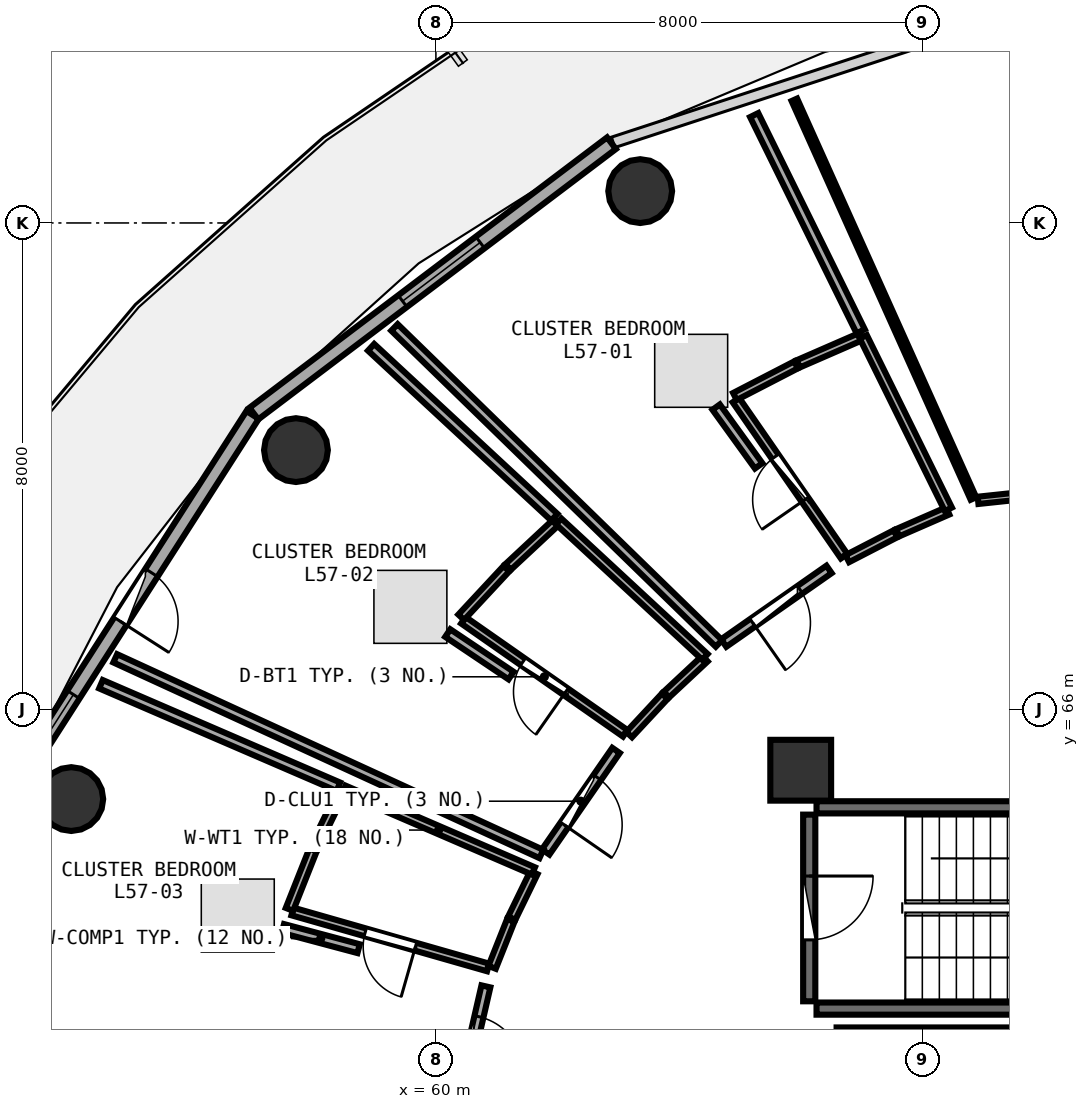
"""IFC4 building model, lengths in metres.
Left out: names, types, materials, properties, quantities, classifications, styles, units other than length and angle.
Written with IfcOpenShell. Run it as: python <this file> out.ifc"""

import sys

from ifc_helpers import new_model, si_unit, direction, frame, frame_2d, origin, origin_2d, place, context, subcontext, project, spatial, rectangle, circle, extrude, element, fill, save


model = new_model("IFC4")
c1 = context("Model", 3, precision=1e-05, world=origin(), true_north=direction((0.0, 1.0)))
c2 = subcontext(c1, "Body", "Model", "MODEL_VIEW")
j1 = project(units=[si_unit("LENGTHUNIT", "METRE"), si_unit("PLANEANGLEUNIT", "RADIAN")], contexts=[c1])
p1 = place(None, origin())
s1 = spatial("IfcSite", under=j1, at=p1, CompositionType="ELEMENT")
p2 = place(p1, origin())
s2 = spatial("IfcBuilding", under=s1, at=p2, CompositionType="ELEMENT")
p3 = place(p2, frame((0.0, 0.0, 223.2)))
s3 = spatial("IfcBuildingStorey", under=s2, at=p3, CompositionType="ELEMENT", Elevation=223.2)
p4 = place(p3, frame((66.0, 65.0, 0.0), z_axis=(0.0, 0.0, 1.0), x_axis=(1.0, 0.0, 0.0)))
e1 = element("IfcColumn", 1, at=p4, inside=s3, PredefinedType="PILASTER", context=c2, shape_type="SweptSolid", body=[
    extrude(rectangle(XDim=1.0, YDim=1.0, at=origin_2d()), origin(), (0.0, 0.0, 1.0), 3.75),
])
for number, where, z_axis, x_axis in (
    (2, (63.36, 74.524, 0.0), (0.0, 0.0, 1.0), (1.0, 0.0, 0.0)),
    (3, (57.698, 70.264, 0.0), (0.0, 0.0, 1.0), (1.0, 0.0, 0.0)),
    (4, (54.003, 64.526, 0.0), (0.0, 0.0, 1.0), (1.0, 0.0, 0.0)),
):
    element("IfcColumn", number, at=place(p3, frame(where, z_axis=z_axis, x_axis=x_axis)), inside=s3, PredefinedType="COLUMN", context=c2, shape_type="SweptSolid", body=[
        extrude(circle(Radius=0.525, at=origin_2d()), origin(), (0.0, 0.0, 1.0), 3.75),
    ])
p5 = place(p3, frame((62.888, 75.312, 0.0), z_axis=(0.0, 0.0, 1.0), x_axis=(-0.797701674595, -0.603052268338, 0.0)))
e5 = element("IfcWall", 5, at=p5, inside=s3, PredefinedType="SOLIDWALL", context=c2, shape_type="SweptSolid", body=[
    extrude(rectangle(XDim=7.374, YDim=0.24, at=frame_2d((3.687, 0.0))), origin(), (0.0, 0.0, 1.0), 3.475),
])
p6 = place(p5, frame((2.707, 0.0, 0.85)))
e6 = element("IfcOpeningElement", 6, at=p6, cuts=e5, PredefinedType="OPENING", context=c2, shape_type="SweptSolid", body=[
    extrude(rectangle(XDim=1.6, YDim=1.45, at=frame_2d((0.8, 0.725))), frame((0.0, 0.13, 0.0), z_axis=(0.0, -1.0, 0.0), x_axis=(1.0, 0.0, 0.0)), (0.0, 0.0, 1.0), 0.26),
])
p7 = place(p3, frame((56.986, 70.843, 0.0), z_axis=(0.0, 0.0, 1.0), x_axis=(-0.539539512973, -0.841960280501, 0.0)))
e7 = element("IfcWall", 7, at=p7, inside=s3, PredefinedType="SOLIDWALL", context=c2, shape_type="SweptSolid", body=[
    extrude(rectangle(XDim=7.115, YDim=0.24, at=frame_2d((3.557, 0.0))), origin(), (0.0, 0.0, 1.0), 3.475),
])
p8 = place(p7, frame((3.082, 0.0, 0.0)))
e8 = element("IfcOpeningElement", 8, at=p8, cuts=e7, PredefinedType="OPENING", context=c2, shape_type="SweptSolid", body=[
    extrude(rectangle(XDim=0.95, YDim=2.1, at=frame_2d((0.475, 1.05))), frame((0.0, 0.13, 0.0), z_axis=(0.0, -1.0, 0.0), x_axis=(1.0, 0.0, 0.0)), (0.0, 0.0, 1.0), 0.26),
])
p9 = place(p7, frame((5.462, 0.0, 0.85)))
e9 = element("IfcOpeningElement", 9, at=p9, cuts=e7, PredefinedType="OPENING", context=c2, shape_type="SweptSolid", body=[
    extrude(rectangle(XDim=1.2, YDim=1.45, at=frame_2d((0.6, 0.725))), frame((0.0, 0.13, 0.0), z_axis=(0.0, -1.0, 0.0), x_axis=(1.0, 0.0, 0.0)), (0.0, 0.0, 1.0), 0.26),
])
for number, where, z_axis, x_axis in (
    (10, (66.26, 61.08, 0.0), (0.0, 0.0, 1.0), (1.0, 0.0, 0.0)),
    (11, (73.42, 64.39, 0.0), (0.0, 0.0, 1.0), (-1.0, 0.0, 0.0)),
):
    element("IfcWall", number, at=place(p3, frame(where, z_axis=z_axis, x_axis=x_axis)), inside=s3, PredefinedType="SHEAR", context=c2, shape_type="SweptSolid", body=[
        extrude(rectangle(XDim=7.16, YDim=0.2, at=frame_2d((3.58, 0.0))), origin(), (0.0, 0.0, 1.0), 3.49),
    ])
p10 = place(p3, frame((66.14, 64.27, 0.0), z_axis=(0.0, 0.0, 1.0), x_axis=(0.0, -1.0, 0.0)))
e12 = element("IfcWall", 12, at=p10, inside=s3, PredefinedType="SHEAR", context=c2, shape_type="SweptSolid", body=[
    extrude(rectangle(XDim=3.07, YDim=0.2, at=frame_2d((1.535, 0.0))), origin(), (0.0, 0.0, 1.0), 3.49),
])
p11 = place(p10, frame((1.01, 0.0, 0.0)))
e13 = element("IfcOpeningElement", 13, at=p11, cuts=e12, PredefinedType="OPENING", context=c2, shape_type="SweptSolid", body=[
    extrude(rectangle(XDim=1.05, YDim=2.1, at=frame_2d((0.525, 1.05))), frame((0.0, 0.11, 0.0), z_axis=(0.0, -1.0, 0.0), x_axis=(1.0, 0.0, 0.0)), (0.0, 0.0, 1.0), 0.22),
])
p12 = place(p3, frame((75.969, 70.189, 0.0), z_axis=(0.0, 0.0, 1.0), x_axis=(-0.994385599796, -0.105817195755, 0.0)))
e14 = element("IfcWall", 14, at=p12, inside=s3, PredefinedType="PARTITIONING", context=c2, shape_type="SweptSolid", body=[
    extrude(rectangle(XDim=7.092, YDim=0.12, at=frame_2d((3.546, 0.0))), origin(), (0.0, 0.0, 1.0), 3.025),
])
p13 = place(p12, frame((3.096, 0.0, 0.0)))
e15 = element("IfcOpeningElement", 15, at=p13, cuts=e14, PredefinedType="OPENING", context=c2, shape_type="SweptSolid", body=[
    extrude(rectangle(XDim=0.9, YDim=2.08, at=frame_2d((0.45, 1.04))), frame((0.0, 0.07, 0.0), z_axis=(0.0, -1.0, 0.0), x_axis=(1.0, 0.0, 0.0)), (0.0, 0.0, 1.0), 0.14),
])
p14 = place(p3, frame((66.714, 68.519, 0.0), z_axis=(0.0, 0.0, 1.0), x_axis=(-0.569575575996, 0.821938965635, 0.0)))
e16 = element("IfcWall", 16, at=p14, inside=s3, PredefinedType="PLUMBINGWALL", context=c2, shape_type="SweptSolid", body=[
    extrude(rectangle(XDim=3.125, YDim=0.13, at=frame_2d((1.562, 0.0))), origin(), (0.0, 0.0, 1.0), 3.175),
])
p15 = place(p14, frame((1.132, 0.0, 0.0)))
e17 = element("IfcOpeningElement", 17, at=p15, cuts=e16, PredefinedType="OPENING", context=c2, shape_type="SweptSolid", body=[
    extrude(rectangle(XDim=0.86, YDim=2.05, at=frame_2d((0.43, 1.025))), frame((0.0, 0.075, 0.0), z_axis=(0.0, -1.0, 0.0), x_axis=(1.0, 0.0, 0.0)), (0.0, 0.0, 1.0), 0.15),
])
p16 = place(p3, frame((66.466, 68.302, 0.0), z_axis=(0.0, 0.0, 1.0), x_axis=(-0.819606107513, -0.572927419948, 0.0)))
e18 = element("IfcWall", 18, at=p16, inside=s3, PredefinedType="PARTITIONING", context=c2, shape_type="SweptSolid", body=[
    extrude(rectangle(XDim=2.114, YDim=0.15, at=frame_2d((1.057, 0.0))), origin(), (0.0, 0.0, 1.0), 3.025),
])
p17 = place(p16, frame((0.582, 0.0, 0.0)))
e19 = element("IfcOpeningElement", 19, at=p17, cuts=e18, PredefinedType="OPENING", context=c2, shape_type="SweptSolid", body=[
    extrude(rectangle(XDim=0.95, YDim=2.08, at=frame_2d((0.475, 1.04))), frame((0.0, 0.085, 0.0), z_axis=(0.0, -1.0, 0.0), x_axis=(1.0, 0.0, 0.0)), (0.0, 0.0, 1.0), 0.17),
])
p18 = place(p3, frame((63.115, 65.606, 0.0), z_axis=(0.0, 0.0, 1.0), x_axis=(-0.819768322712, 0.57269529165, 0.0)))
e20 = element("IfcWall", 20, at=p18, inside=s3, PredefinedType="PLUMBINGWALL", context=c2, shape_type="SweptSolid", body=[
    extrude(rectangle(XDim=3.248, YDim=0.13, at=frame_2d((1.624, 0.0))), origin(), (0.0, 0.0, 1.0), 3.175),
])
p19 = place(p18, frame((1.194, 0.0, 0.0)))
e21 = element("IfcOpeningElement", 21, at=p19, cuts=e20, PredefinedType="OPENING", context=c2, shape_type="SweptSolid", body=[
    extrude(rectangle(XDim=0.86, YDim=2.05, at=frame_2d((0.43, 1.025))), frame((0.0, 0.075, 0.0), z_axis=(0.0, -1.0, 0.0), x_axis=(1.0, 0.0, 0.0)), (0.0, 0.0, 1.0), 0.15),
])
p20 = place(p3, frame((62.963, 65.326, 0.0), z_axis=(0.0, 0.0, 1.0), x_axis=(-0.569634666298, -0.821898014933, 0.0)))
e22 = element("IfcWall", 22, at=p20, inside=s3, PredefinedType="PARTITIONING", context=c2, shape_type="SweptSolid", body=[
    extrude(rectangle(XDim=2.032, YDim=0.15, at=frame_2d((1.016, 0.0))), origin(), (0.0, 0.0, 1.0), 3.025),
])
p21 = place(p20, frame((0.541, 0.0, 0.0)))
e23 = element("IfcOpeningElement", 23, at=p21, cuts=e22, PredefinedType="OPENING", context=c2, shape_type="SweptSolid", body=[
    extrude(rectangle(XDim=0.95, YDim=2.08, at=frame_2d((0.475, 1.04))), frame((0.0, 0.085, 0.0), z_axis=(0.0, -1.0, 0.0), x_axis=(1.0, 0.0, 0.0)), (0.0, 0.0, 1.0), 0.17),
])
p22 = place(p3, frame((60.859, 61.757, 0.0), z_axis=(0.0, 0.0, 1.0), x_axis=(-0.961479890051, 0.274875282679, 0.0)))
e24 = element("IfcWall", 24, at=p22, inside=s3, PredefinedType="PLUMBINGWALL", context=c2, shape_type="SweptSolid", body=[
    extrude(rectangle(XDim=3.347, YDim=0.13, at=frame_2d((1.673, 0.0))), origin(), (0.0, 0.0, 1.0), 3.175),
])
p23 = place(p22, frame((1.243, 0.0, 0.0)))
e25 = element("IfcOpeningElement", 25, at=p23, cuts=e24, PredefinedType="OPENING", context=c2, shape_type="SweptSolid", body=[
    extrude(rectangle(XDim=0.86, YDim=2.05, at=frame_2d((0.43, 1.025))), frame((0.0, 0.075, 0.0), z_axis=(0.0, -1.0, 0.0), x_axis=(1.0, 0.0, 0.0)), (0.0, 0.0, 1.0), 0.15),
])
p24 = place(p3, frame((60.823, 61.446, 0.0), z_axis=(0.0, 0.0, 1.0), x_axis=(-0.223956243079, -0.97459920028, 0.0)))
e26 = element("IfcWall", 26, at=p24, inside=s3, PredefinedType="PARTITIONING", context=c2, shape_type="SweptSolid", body=[
    extrude(rectangle(XDim=1.974, YDim=0.15, at=frame_2d((0.987, 0.0))), origin(), (0.0, 0.0, 1.0), 3.48),
])
p25 = place(p24, frame((0.512, 0.0, 0.0)))
e27 = element("IfcOpeningElement", 27, at=p25, cuts=e26, PredefinedType="OPENING", context=c2, shape_type="SweptSolid", body=[
    extrude(rectangle(XDim=0.95, YDim=2.08, at=frame_2d((0.475, 1.04))), frame((0.0, 0.085, 0.0), z_axis=(0.0, -1.0, 0.0), x_axis=(1.0, 0.0, 0.0)), (0.0, 0.0, 1.0), 0.17),
])
p26 = place(p3, frame((72.41, 60.72, 0.0), z_axis=(0.0, 0.0, 1.0), x_axis=(-1.0, 0.0, 0.0)))
e28 = element("IfcWall", 28, at=p26, inside=s3, PredefinedType="PARTITIONING", context=c2, shape_type="SweptSolid", body=[
    extrude(rectangle(XDim=5.82, YDim=0.1, at=frame_2d((2.91, 0.0))), origin(), (0.0, 0.0, 1.0), 3.48),
])
p27 = place(p3, frame((68.841, 69.469, 0.0), z_axis=(0.0, 0.0, 1.0), x_axis=(-0.409724811959, 0.912209174732, 0.0)))
e29 = element("IfcWall", 29, at=p27, inside=s3, PredefinedType="PARTITIONING", context=c2, shape_type="SweptSolid", body=[
    extrude(rectangle(XDim=7.188, YDim=0.1, at=frame_2d((3.594, 0.0))), origin(), (0.0, 0.0, 1.0), 3.075),
])
p28 = place(p3, frame((68.419, 69.265, 0.0), z_axis=(0.0, 0.0, 1.0), x_axis=(-0.916724041683, -0.399521002453, 0.0)))
e30 = element("IfcWall", 30, at=p28, inside=s3, PredefinedType="PLUMBINGWALL", context=c2, shape_type="SweptSolid", body=[
    extrude(rectangle(XDim=0.898, YDim=0.13, at=frame_2d((0.449, 0.0))), origin(), (0.0, 0.0, 1.0), 3.235),
])
p29 = place(p3, frame((67.559, 68.889, 0.0), z_axis=(0.0, 0.0, 1.0), x_axis=(-0.888498384955, -0.458879744523, 0.0)))
e31 = element("IfcWall", 31, at=p29, inside=s3, PredefinedType="PLUMBINGWALL", context=c2, shape_type="SweptSolid", body=[
    extrude(rectangle(XDim=0.893, YDim=0.13, at=frame_2d((0.446, 0.0))), origin(), (0.0, 0.0, 1.0), 3.235),
])
p30 = place(p3, frame((64.918, 71.146, 0.0), z_axis=(0.0, 0.0, 1.0), x_axis=(0.88839364622, 0.459082486439, 0.0)))
e32 = element("IfcWall", 32, at=p30, inside=s3, PredefinedType="PLUMBINGWALL", context=c2, shape_type="SweptSolid", body=[
    extrude(rectangle(XDim=1.132, YDim=0.13, at=frame_2d((0.566, 0.0))), origin(), (0.0, 0.0, 1.0), 3.48),
])
p31 = place(p3, frame((65.959, 71.683, 0.0), z_axis=(0.0, 0.0, 1.0), x_axis=(0.916875363269, 0.399173606631, 0.0)))
e33 = element("IfcWall", 33, at=p31, inside=s3, PredefinedType="PLUMBINGWALL", context=c2, shape_type="SweptSolid", body=[
    extrude(rectangle(XDim=1.137, YDim=0.13, at=frame_2d((0.568, 0.0))), origin(), (0.0, 0.0, 1.0), 3.48),
])
p32 = place(p3, frame((67.029, 72.127, 0.0), z_axis=(0.0, 0.0, 1.0), x_axis=(0.442483009424, -0.896776887732, 0.0)))
e34 = element("IfcWall", 34, at=p32, inside=s3, PredefinedType="PLUMBINGWALL", context=c2, shape_type="SweptSolid", body=[
    extrude(rectangle(XDim=3.163, YDim=0.13, at=frame_2d((1.581, 0.0))), origin(), (0.0, 0.0, 1.0), 3.175),
])
p33 = place(p3, frame((64.655, 67.085, 0.0), z_axis=(0.0, 0.0, 1.0), x_axis=(-0.716418161924, 0.697671138335, 0.0)))
e35 = element("IfcWall", 35, at=p33, inside=s3, PredefinedType="PARTITIONING", context=c2, shape_type="SweptSolid", body=[
    extrude(rectangle(XDim=7.449, YDim=0.15, at=frame_2d((3.725, 0.0))), origin(), (0.0, 0.0, 1.0), 3.075),
])
p34 = place(p3, frame((65.235, 75.774, 0.0), z_axis=(0.0, 0.0, 1.0), x_axis=(0.441884590329, -0.897071908394, 0.0)))
e36 = element("IfcWall", 36, at=p34, inside=s3, PredefinedType="PARTITIONING", context=c2, shape_type="SweptSolid", body=[
    extrude(rectangle(XDim=3.964, YDim=0.15, at=frame_2d((1.982, 0.0))), origin(), (0.0, 0.0, 1.0), 3.075),
])
p35 = place(p3, frame((64.609, 70.972, 0.0), z_axis=(0.0, 0.0, 1.0), x_axis=(0.586088334164, -0.810247162634, 0.0)))
e37 = element("IfcWall", 37, at=p35, inside=s3, PredefinedType="PARTITIONING", context=c2, shape_type="SweptSolid", body=[
    extrude(rectangle(XDim=1.193, YDim=0.15, at=frame_2d((0.596, 0.0))), origin(), (0.0, 0.0, 1.0), 3.175),
])
p36 = place(p3, frame((64.425, 66.836, 0.0), z_axis=(0.0, 0.0, 1.0), x_axis=(-0.73090544696, -0.68247873784, 0.0)))
e38 = element("IfcWall", 38, at=p36, inside=s3, PredefinedType="PLUMBINGWALL", context=c2, shape_type="SweptSolid", body=[
    extrude(rectangle(XDim=0.867, YDim=0.13, at=frame_2d((0.434, 0.0))), origin(), (0.0, 0.0, 1.0), 3.025),
])
p37 = place(p3, frame((63.763, 66.216, 0.0), z_axis=(0.0, 0.0, 1.0), x_axis=(-0.681245485542, -0.732055044672, 0.0)))
e39 = element("IfcWall", 39, at=p37, inside=s3, PredefinedType="PLUMBINGWALL", context=c2, shape_type="SweptSolid", body=[
    extrude(rectangle(XDim=0.86, YDim=0.13, at=frame_2d((0.43, 0.0))), origin(), (0.0, 0.0, 1.0), 3.025),
])
p38 = place(p3, frame((60.417, 67.516, 0.0), z_axis=(0.0, 0.0, 1.0), x_axis=(0.68101744228, 0.732267193933, 0.0)))
e40 = element("IfcWall", 40, at=p38, inside=s3, PredefinedType="PLUMBINGWALL", context=c2, shape_type="SweptSolid", body=[
    extrude(rectangle(XDim=1.091, YDim=0.13, at=frame_2d((0.545, 0.0))), origin(), (0.0, 0.0, 1.0), 3.025),
])
p39 = place(p3, frame((61.188, 68.343, 0.0), z_axis=(0.0, 0.0, 1.0), x_axis=(0.731358373013, 0.681993350572, 0.0)))
e41 = element("IfcWall", 41, at=p39, inside=s3, PredefinedType="PLUMBINGWALL", context=c2, shape_type="SweptSolid", body=[
    extrude(rectangle(XDim=1.098, YDim=0.13, at=frame_2d((0.549, 0.0))), origin(), (0.0, 0.0, 1.0), 3.175),
])
p40 = place(p3, frame((62.02, 69.091, 0.0), z_axis=(0.0, 0.0, 1.0), x_axis=(0.733691925976, -0.679482271849, 0.0)))
e42 = element("IfcWall", 42, at=p40, inside=s3, PredefinedType="PLUMBINGWALL", context=c2, shape_type="SweptSolid", body=[
    extrude(rectangle(XDim=3.279, YDim=0.13, at=frame_2d((1.639, 0.0))), origin(), (0.0, 0.0, 1.0), 3.175),
])
p41 = place(p3, frame((61.735, 63.623, 0.0), z_axis=(0.0, 0.0, 1.0), x_axis=(-0.908799831152, 0.417232389561, 0.0)))
e43 = element("IfcWall", 43, at=p41, inside=s3, PredefinedType="PARTITIONING", context=c2, shape_type="SweptSolid", body=[
    extrude(rectangle(XDim=7.712, YDim=0.15, at=frame_2d((3.856, 0.0))), origin(), (0.0, 0.0, 1.0), 3.025),
])
p42 = place(p3, frame((58.934, 71.955, 0.0), z_axis=(0.0, 0.0, 1.0), x_axis=(0.733337091809, -0.679865214419, 0.0)))
e44 = element("IfcWall", 44, at=p42, inside=s3, PredefinedType="PARTITIONING", context=c2, shape_type="SweptSolid", body=[
    extrude(rectangle(XDim=4.109, YDim=0.15, at=frame_2d((2.055, 0.0))), origin(), (0.0, 0.0, 1.0), 3.075),
])
p43 = place(p3, frame((60.195, 67.256, 0.0), z_axis=(0.0, 0.0, 1.0), x_axis=(0.830279043522, -0.557347925347, 0.0)))
e45 = element("IfcWall", 45, at=p43, inside=s3, PredefinedType="PARTITIONING", context=c2, shape_type="SweptSolid", body=[
    extrude(rectangle(XDim=1.254, YDim=0.15, at=frame_2d((0.627, 0.0))), origin(), (0.0, 0.0, 1.0), 3.175),
])
p44 = place(p3, frame((61.613, 63.318, 0.0), z_axis=(0.0, 0.0, 1.0), x_axis=(-0.437484879269, -0.899225767208, 0.0)))
e46 = element("IfcWall", 46, at=p44, inside=s3, PredefinedType="PLUMBINGWALL", context=c2, shape_type="SweptSolid", body=[
    extrude(rectangle(XDim=0.835, YDim=0.13, at=frame_2d((0.418, 0.0))), origin(), (0.0, 0.0, 1.0), 3.235),
])
p45 = place(p3, frame((61.232, 62.531, 0.0), z_axis=(0.0, 0.0, 1.0), x_axis=(-0.369921104598, -0.929063171358, 0.0)))
e47 = element("IfcWall", 47, at=p45, inside=s3, PredefinedType="PLUMBINGWALL", context=c2, shape_type="SweptSolid", body=[
    extrude(rectangle(XDim=0.831, YDim=0.13, at=frame_2d((0.416, 0.0))), origin(), (0.0, 0.0, 1.0), 3.235),
])
p46 = place(p3, frame((57.591, 62.712, 0.0), z_axis=(0.0, 0.0, 1.0), x_axis=(0.368988727478, 0.929433870157, 0.0)))
e48 = element("IfcWall", 48, at=p46, inside=s3, PredefinedType="PLUMBINGWALL", context=c2, shape_type="SweptSolid", body=[
    extrude(rectangle(XDim=1.052, YDim=0.13, at=frame_2d((0.526, 0.0))), origin(), (0.0, 0.0, 1.0), 3.48),
])
p47 = place(p3, frame((57.996, 63.726, 0.0), z_axis=(0.0, 0.0, 1.0), x_axis=(0.438432715101, 0.898764014816, 0.0)))
e49 = element("IfcWall", 49, at=p47, inside=s3, PredefinedType="PLUMBINGWALL", context=c2, shape_type="SweptSolid", body=[
    extrude(rectangle(XDim=1.059, YDim=0.13, at=frame_2d((0.53, 0.0))), origin(), (0.0, 0.0, 1.0), 3.025),
])
p48 = place(p3, frame((58.487, 64.688, 0.0), z_axis=(0.0, 0.0, 1.0), x_axis=(0.918238400885, -0.396028078727, 0.0)))
e50 = element("IfcWall", 50, at=p48, inside=s3, PredefinedType="PLUMBINGWALL", context=c2, shape_type="SweptSolid", body=[
    extrude(rectangle(XDim=3.394, YDim=0.13, at=frame_2d((1.697, 0.0))), origin(), (0.0, 0.0, 1.0), 3.025),
])
p49 = place(p3, frame((54.492, 66.414, 0.0), z_axis=(0.0, 0.0, 1.0), x_axis=(0.918147334224, -0.396239160934, 0.0)))
e51 = element("IfcWall", 51, at=p49, inside=s3, PredefinedType="PARTITIONING", context=c2, shape_type="SweptSolid", body=[
    extrude(rectangle(XDim=4.253, YDim=0.15, at=frame_2d((2.126, 0.0))), origin(), (0.0, 0.0, 1.0), 3.025),
])
p50 = place(p3, frame((57.483, 62.398, 0.0), z_axis=(0.0, 0.0, 1.0), x_axis=(0.966263202112, -0.257556642788, 0.0)))
e52 = element("IfcWall", 52, at=p50, inside=s3, PredefinedType="PARTITIONING", context=c2, shape_type="SweptSolid", body=[
    extrude(rectangle(XDim=1.29, YDim=0.15, at=frame_2d((0.645, 0.0))), origin(), (0.0, 0.0, 1.0), 3.175),
])
p51 = place(p6, origin())
e53 = element("IfcWindow", 53, at=p51, inside=s3, PartitioningType="SINGLE_PANEL", PredefinedType="WINDOW", context=c2, shape_type="SweptSolid", body=[
    extrude(rectangle(XDim=1.6, YDim=1.45, at=frame_2d((0.8, 0.725))), frame((0.0, 0.03, 0.0), z_axis=(0.0, -1.0, 0.0), x_axis=(1.0, 0.0, 0.0)), (0.0, 0.0, 1.0), 0.06),
])
fill(e6, e53)
p52 = place(p8, frame((0.95, 0.0, 0.0), z_axis=(0.0, 0.0, 1.0), x_axis=(-1.0, 0.0, 0.0)))
e54 = element("IfcDoor", 54, at=p52, inside=s3, OperationType="SINGLE_SWING_LEFT", PredefinedType="DOOR", context=c2, shape_type="SweptSolid", body=[
    extrude(rectangle(XDim=0.95, YDim=2.1, at=frame_2d((0.475, 1.05))), frame((0.0, 0.025, 0.0), z_axis=(0.0, -1.0, 0.0), x_axis=(1.0, 0.0, 0.0)), (0.0, 0.0, 1.0), 0.05),
])
fill(e8, e54)
p53 = place(p9, origin())
e55 = element("IfcWindow", 55, at=p53, inside=s3, PartitioningType="SINGLE_PANEL", PredefinedType="WINDOW", context=c2, shape_type="SweptSolid", body=[
    extrude(rectangle(XDim=1.2, YDim=1.45, at=frame_2d((0.6, 0.725))), frame((0.0, 0.03, 0.0), z_axis=(0.0, -1.0, 0.0), x_axis=(1.0, 0.0, 0.0)), (0.0, 0.0, 1.0), 0.06),
])
fill(e9, e55)
p54 = place(p11, origin())
e56 = element("IfcDoor", 56, at=p54, inside=s3, OperationType="SINGLE_SWING_LEFT", PredefinedType="DOOR", context=c2, shape_type="SweptSolid", body=[
    extrude(rectangle(XDim=1.05, YDim=2.1, at=frame_2d((0.525, 1.05))), frame((0.0, 0.025, 0.0), z_axis=(0.0, -1.0, 0.0), x_axis=(1.0, 0.0, 0.0)), (0.0, 0.0, 1.0), 0.05),
])
fill(e13, e56)
p55 = place(p15, origin())
e57 = element("IfcDoor", 57, at=p55, inside=s3, OperationType="SINGLE_SWING_LEFT", PredefinedType="DOOR", context=c2, shape_type="SweptSolid", body=[
    extrude(rectangle(XDim=0.86, YDim=2.05, at=frame_2d((0.43, 1.025))), frame((0.0, 0.025, 0.0), z_axis=(0.0, -1.0, 0.0), x_axis=(1.0, 0.0, 0.0)), (0.0, 0.0, 1.0), 0.05),
])
fill(e17, e57)
p56 = place(p17, origin())
e58 = element("IfcDoor", 58, at=p56, inside=s3, OperationType="SINGLE_SWING_RIGHT", PredefinedType="DOOR", context=c2, shape_type="SweptSolid", body=[
    extrude(rectangle(XDim=0.95, YDim=2.08, at=frame_2d((0.475, 1.04))), frame((0.0, 0.025, 0.0), z_axis=(0.0, -1.0, 0.0), x_axis=(1.0, 0.0, 0.0)), (0.0, 0.0, 1.0), 0.05),
])
fill(e19, e58)
p57 = place(p19, origin())
e59 = element("IfcDoor", 59, at=p57, inside=s3, OperationType="SINGLE_SWING_LEFT", PredefinedType="DOOR", context=c2, shape_type="SweptSolid", body=[
    extrude(rectangle(XDim=0.86, YDim=2.05, at=frame_2d((0.43, 1.025))), frame((0.0, 0.025, 0.0), z_axis=(0.0, -1.0, 0.0), x_axis=(1.0, 0.0, 0.0)), (0.0, 0.0, 1.0), 0.05),
])
fill(e21, e59)
p58 = place(p21, origin())
e60 = element("IfcDoor", 60, at=p58, inside=s3, OperationType="SINGLE_SWING_RIGHT", PredefinedType="DOOR", context=c2, shape_type="SweptSolid", body=[
    extrude(rectangle(XDim=0.95, YDim=2.08, at=frame_2d((0.475, 1.04))), frame((0.0, 0.025, 0.0), z_axis=(0.0, -1.0, 0.0), x_axis=(1.0, 0.0, 0.0)), (0.0, 0.0, 1.0), 0.05),
])
fill(e23, e60)
p59 = place(p23, origin())
e61 = element("IfcDoor", 61, at=p59, inside=s3, OperationType="SINGLE_SWING_LEFT", PredefinedType="DOOR", context=c2, shape_type="SweptSolid", body=[
    extrude(rectangle(XDim=0.86, YDim=2.05, at=frame_2d((0.43, 1.025))), frame((0.0, 0.025, 0.0), z_axis=(0.0, -1.0, 0.0), x_axis=(1.0, 0.0, 0.0)), (0.0, 0.0, 1.0), 0.05),
])
fill(e25, e61)
p60 = place(p25, origin())
e62 = element("IfcDoor", 62, at=p60, inside=s3, OperationType="SINGLE_SWING_RIGHT", PredefinedType="DOOR", context=c2, shape_type="SweptSolid", body=[
    extrude(rectangle(XDim=0.95, YDim=2.08, at=frame_2d((0.475, 1.04))), frame((0.0, 0.025, 0.0), z_axis=(0.0, -1.0, 0.0), x_axis=(1.0, 0.0, 0.0)), (0.0, 0.0, 1.0), 0.05),
])
fill(e27, e62)
save(model, sys.argv[1])
